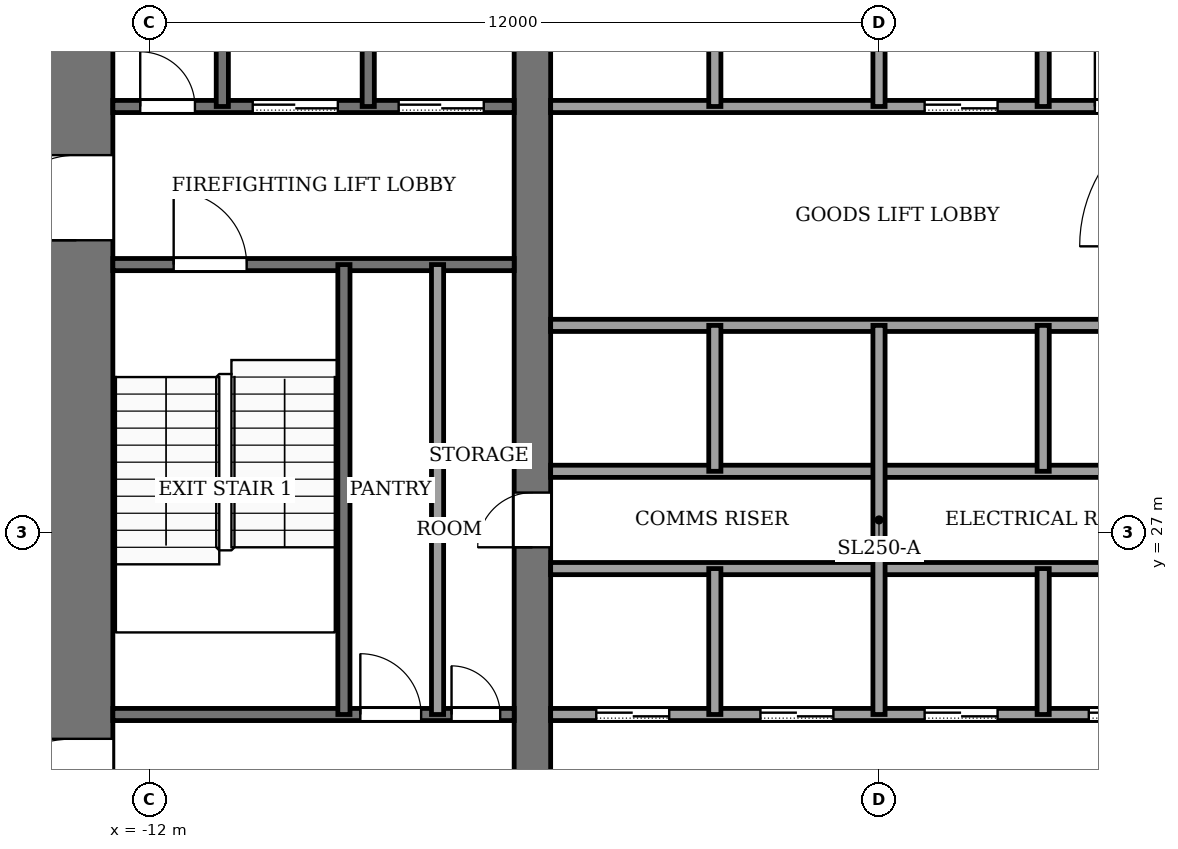
"""IFC4 building model, lengths in metres.
Left out: names, types, materials, properties, quantities, classifications, styles, units other than length and angle.
Written with IfcOpenShell. Run it as: python <this file> out.ifc"""

import sys

from ifc_helpers import new_model, si_unit, direction, frame, frame_2d, origin, place, context, subcontext, project, spatial, rectangle, extrude, element, fill, save


model = new_model("IFC4")
c1 = context("Model", 3, precision=1e-05, world=origin(), true_north=direction((0.0, 1.0)))
c2 = subcontext(c1, "Body", "Model", "MODEL_VIEW")
j1 = project(units=[si_unit("LENGTHUNIT", "METRE"), si_unit("PLANEANGLEUNIT", "RADIAN")], contexts=[c1])
p1 = place(None, origin())
s1 = spatial("IfcSite", under=j1, at=p1, CompositionType="ELEMENT")
p2 = place(p1, origin())
s2 = spatial("IfcBuilding", under=s1, at=p2, CompositionType="ELEMENT")
p3 = place(p2, frame((0.0, 0.0, 106.0)))
s3 = spatial("IfcBuildingStorey", under=s2, at=p3, CompositionType="ELEMENT", Elevation=106.0)
p4 = place(p3, frame((-13.2, 18.4, -0.13), z_axis=(0.0, 0.0, 1.0), x_axis=(0.0, 1.0, 0.0)))
e1 = element("IfcWall", 1, at=p4, inside=s3, PredefinedType="SHEAR", context=c2, shape_type="SweptSolid", body=[
    extrude(rectangle(XDim=19.2, YDim=1.2, at=frame_2d((9.6, 0.0))), origin(), (0.0, 0.0, 1.0), 4.0),
])
p5 = place(p4, frame((2.8, 0.0, 0.13)))
e2 = element("IfcOpeningElement", 2, at=p5, cuts=e1, PredefinedType="OPENING", context=c2, shape_type="SweptSolid", body=[
    extrude(rectangle(XDim=2.4, YDim=2.4, at=frame_2d((1.2, 1.2))), frame((0.0, 0.61, 0.0), z_axis=(0.0, -1.0, 0.0), x_axis=(1.0, 0.0, 0.0)), (0.0, 0.0, 1.0), 1.22),
])
p6 = place(p4, frame((13.4, 0.0, 0.13)))
e3 = element("IfcOpeningElement", 3, at=p6, cuts=e1, PredefinedType="OPENING", context=c2, shape_type="SweptSolid", body=[
    extrude(rectangle(XDim=1.4, YDim=2.2, at=frame_2d((0.7, 1.1))), frame((0.0, 0.61, 0.0), z_axis=(0.0, -1.0, 0.0), x_axis=(1.0, 0.0, 0.0)), (0.0, 0.0, 1.0), 1.22),
])
p7 = place(p3, frame((-5.7, 18.4, -0.13), z_axis=(0.0, 0.0, 1.0), x_axis=(0.0, 1.0, 0.0)))
e4 = element("IfcWall", 4, at=p7, inside=s3, PredefinedType="SHEAR", context=c2, shape_type="SweptSolid", body=[
    extrude(rectangle(XDim=19.2, YDim=0.6, at=frame_2d((9.6, 0.0))), origin(), (0.0, 0.0, 1.0), 4.0),
])
p8 = place(p7, frame((8.35, 0.0, 0.13)))
e5 = element("IfcOpeningElement", 5, at=p8, cuts=e4, PredefinedType="OPENING", context=c2, shape_type="SweptSolid", body=[
    extrude(rectangle(XDim=0.9, YDim=2.1, at=frame_2d((0.45, 1.05))), frame((0.0, 0.31, 0.0), z_axis=(0.0, -1.0, 0.0), x_axis=(1.0, 0.0, 0.0)), (0.0, 0.0, 1.0), 0.62),
])
p9 = place(p3, frame((-12.6, 24.0, 0.0), z_axis=(0.0, 0.0, 1.0), x_axis=(1.0, 0.0, 0.0)))
e6 = element("IfcWall", 6, at=p9, inside=s3, PredefinedType="PARTITIONING", context=c2, shape_type="SweptSolid", body=[
    extrude(rectangle(XDim=6.6, YDim=0.2, at=frame_2d((3.3, 0.0))), origin(), (0.0, 0.0, 1.0), 3.87),
])
p10 = place(p9, frame((4.07, 0.0, 0.0)))
e7 = element("IfcOpeningElement", 7, at=p10, cuts=e6, PredefinedType="OPENING", context=c2, shape_type="SweptSolid", body=[
    extrude(rectangle(XDim=1.0, YDim=2.1, at=frame_2d((0.5, 1.05))), frame((0.0, 0.11, 0.0), z_axis=(0.0, -1.0, 0.0), x_axis=(1.0, 0.0, 0.0)), (0.0, 0.0, 1.0), 0.22),
])
p11 = place(p9, frame((5.57, 0.0, 0.0)))
e8 = element("IfcOpeningElement", 8, at=p11, cuts=e6, PredefinedType="OPENING", context=c2, shape_type="SweptSolid", body=[
    extrude(rectangle(XDim=0.8, YDim=2.1, at=frame_2d((0.4, 1.05))), frame((0.0, 0.11, 0.0), z_axis=(0.0, -1.0, 0.0), x_axis=(1.0, 0.0, 0.0)), (0.0, 0.0, 1.0), 0.22),
])
p12 = place(p3, frame((-5.4, 24.0, 0.0), z_axis=(0.0, 0.0, 1.0), x_axis=(1.0, 0.0, 0.0)))
e9 = element("IfcWall", 9, at=p12, inside=s3, PredefinedType="PARTITIONING", context=c2, shape_type="SweptSolid", body=[
    extrude(rectangle(XDim=10.8, YDim=0.2, at=frame_2d((5.4, 0.0))), origin(), (0.0, 0.0, 1.0), 3.87),
])
p13 = place(p12, frame((0.75, 0.0, 0.0)))
e10 = element("IfcOpeningElement", 10, at=p13, cuts=e9, PredefinedType="OPENING", context=c2, shape_type="SweptSolid", body=[
    extrude(rectangle(XDim=1.2, YDim=2.2, at=frame_2d((0.6, 1.1))), frame((0.0, 0.11, 0.0), z_axis=(0.0, -1.0, 0.0), x_axis=(1.0, 0.0, 0.0)), (0.0, 0.0, 1.0), 0.22),
])
p14 = place(p12, frame((3.45, 0.0, 0.0)))
e11 = element("IfcOpeningElement", 11, at=p14, cuts=e9, PredefinedType="OPENING", context=c2, shape_type="SweptSolid", body=[
    extrude(rectangle(XDim=1.2, YDim=2.2, at=frame_2d((0.6, 1.1))), frame((0.0, 0.11, 0.0), z_axis=(0.0, -1.0, 0.0), x_axis=(1.0, 0.0, 0.0)), (0.0, 0.0, 1.0), 0.22),
])
p15 = place(p12, frame((6.15, 0.0, 0.0)))
e12 = element("IfcOpeningElement", 12, at=p15, cuts=e9, PredefinedType="OPENING", context=c2, shape_type="SweptSolid", body=[
    extrude(rectangle(XDim=1.2, YDim=2.2, at=frame_2d((0.6, 1.1))), frame((0.0, 0.11, 0.0), z_axis=(0.0, -1.0, 0.0), x_axis=(1.0, 0.0, 0.0)), (0.0, 0.0, 1.0), 0.22),
])
p16 = place(p12, frame((8.85, 0.0, 0.0)))
e13 = element("IfcOpeningElement", 13, at=p16, cuts=e9, PredefinedType="OPENING", context=c2, shape_type="SweptSolid", body=[
    extrude(rectangle(XDim=1.2, YDim=2.2, at=frame_2d((0.6, 1.1))), frame((0.0, 0.11, 0.0), z_axis=(0.0, -1.0, 0.0), x_axis=(1.0, 0.0, 0.0)), (0.0, 0.0, 1.0), 0.22),
])
for number, where, z_axis, x_axis in (
    (14, (-5.4, 26.4, 0.0), (0.0, 0.0, 1.0), (1.0, 0.0, 0.0)),
    (15, (-5.4, 28.0, 0.0), (0.0, 0.0, 1.0), (1.0, 0.0, 0.0)),
    (16, (-5.4, 30.4, 0.0), (0.0, 0.0, 1.0), (1.0, 0.0, 0.0)),
):
    element("IfcWall", number, at=place(p3, frame(where, z_axis=z_axis, x_axis=x_axis)), inside=s3, PredefinedType="PARTITIONING", context=c2, shape_type="SweptSolid", body=[
        extrude(rectangle(XDim=10.8, YDim=0.2, at=frame_2d((5.4, 0.0))), origin(), (0.0, 0.0, 1.0), 3.87),
    ])
p17 = place(p3, frame((-12.6, 31.4, 0.0), z_axis=(0.0, 0.0, 1.0), x_axis=(1.0, 0.0, 0.0)))
e17 = element("IfcWall", 17, at=p17, inside=s3, PredefinedType="PARTITIONING", context=c2, shape_type="SweptSolid", body=[
    extrude(rectangle(XDim=6.6, YDim=0.2, at=frame_2d((3.3, 0.0))), origin(), (0.0, 0.0, 1.0), 3.87),
])
p18 = place(p17, frame((1.0, 0.0, 0.0)))
e18 = element("IfcOpeningElement", 18, at=p18, cuts=e17, PredefinedType="OPENING", context=c2, shape_type="SweptSolid", body=[
    extrude(rectangle(XDim=1.2, YDim=2.2, at=frame_2d((0.6, 1.1))), frame((0.0, 0.11, 0.0), z_axis=(0.0, -1.0, 0.0), x_axis=(1.0, 0.0, 0.0)), (0.0, 0.0, 1.0), 0.22),
])
p19 = place(p3, frame((-12.6, 34.0, 0.0), z_axis=(0.0, 0.0, 1.0), x_axis=(1.0, 0.0, 0.0)))
e19 = element("IfcWall", 19, at=p19, inside=s3, PredefinedType="PARTITIONING", context=c2, shape_type="SweptSolid", body=[
    extrude(rectangle(XDim=6.6, YDim=0.2, at=frame_2d((3.3, 0.0))), origin(), (0.0, 0.0, 1.0), 3.87),
])
p20 = place(p19, frame((4.7, 0.0, 0.0)))
e20 = element("IfcOpeningElement", 20, at=p20, cuts=e19, PredefinedType="OPENING", context=c2, shape_type="SweptSolid", body=[
    extrude(rectangle(XDim=1.4, YDim=2.2, at=frame_2d((0.7, 1.1))), frame((0.0, 0.11, 0.0), z_axis=(0.0, -1.0, 0.0), x_axis=(1.0, 0.0, 0.0)), (0.0, 0.0, 1.0), 0.22),
])
p21 = place(p19, frame((2.3, 0.0, 0.0)))
e21 = element("IfcOpeningElement", 21, at=p21, cuts=e19, PredefinedType="OPENING", context=c2, shape_type="SweptSolid", body=[
    extrude(rectangle(XDim=1.4, YDim=2.2, at=frame_2d((0.7, 1.1))), frame((0.0, 0.11, 0.0), z_axis=(0.0, -1.0, 0.0), x_axis=(1.0, 0.0, 0.0)), (0.0, 0.0, 1.0), 0.22),
])
p22 = place(p19, frame((0.45, 0.0, 0.0)))
e22 = element("IfcOpeningElement", 22, at=p22, cuts=e19, PredefinedType="OPENING", context=c2, shape_type="SweptSolid", body=[
    extrude(rectangle(XDim=0.9, YDim=2.1, at=frame_2d((0.45, 1.05))), frame((0.0, 0.11, 0.0), z_axis=(0.0, -1.0, 0.0), x_axis=(1.0, 0.0, 0.0)), (0.0, 0.0, 1.0), 0.22),
])
p23 = place(p3, frame((-5.4, 34.0, 0.0), z_axis=(0.0, 0.0, 1.0), x_axis=(1.0, 0.0, 0.0)))
e23 = element("IfcWall", 23, at=p23, inside=s3, PredefinedType="PARTITIONING", context=c2, shape_type="SweptSolid", body=[
    extrude(rectangle(XDim=10.8, YDim=0.2, at=frame_2d((5.4, 0.0))), origin(), (0.0, 0.0, 1.0), 3.87),
])
p24 = place(p23, frame((6.15, 0.0, 0.0)))
e24 = element("IfcOpeningElement", 24, at=p24, cuts=e23, PredefinedType="OPENING", context=c2, shape_type="SweptSolid", body=[
    extrude(rectangle(XDim=1.2, YDim=2.2, at=frame_2d((0.6, 1.1))), frame((0.0, 0.11, 0.0), z_axis=(0.0, -1.0, 0.0), x_axis=(1.0, 0.0, 0.0)), (0.0, 0.0, 1.0), 0.22),
])
p25 = place(p23, frame((8.95, 0.0, 0.0)))
e25 = element("IfcOpeningElement", 25, at=p25, cuts=e23, PredefinedType="OPENING", context=c2, shape_type="SweptSolid", body=[
    extrude(rectangle(XDim=1.0, YDim=2.1, at=frame_2d((0.5, 1.05))), frame((0.0, 0.11, 0.0), z_axis=(0.0, -1.0, 0.0), x_axis=(1.0, 0.0, 0.0)), (0.0, 0.0, 1.0), 0.22),
])
p26 = place(p3, frame((-10.8, 34.0, 0.0), z_axis=(0.0, 0.0, 1.0), x_axis=(0.0, 1.0, 0.0)))
e26 = element("IfcWall", 26, at=p26, inside=s3, PredefinedType="PARTITIONING", context=c2, shape_type="SweptSolid", body=[
    extrude(rectangle(XDim=3.6, YDim=0.2, at=frame_2d((1.8, 0.0))), origin(), (0.0, 0.0, 1.0), 3.87),
])
p27 = place(p3, frame((-8.8, 24.0, 0.0), z_axis=(0.0, 0.0, 1.0), x_axis=(0.0, 1.0, 0.0)))
e27 = element("IfcWall", 27, at=p27, inside=s3, PredefinedType="PARTITIONING", context=c2, shape_type="SweptSolid", body=[
    extrude(rectangle(XDim=7.4, YDim=0.2, at=frame_2d((3.7, 0.0))), origin(), (0.0, 0.0, 1.0), 3.87),
])
p28 = place(p3, frame((-8.4, 34.0, 0.0), z_axis=(0.0, 0.0, 1.0), x_axis=(0.0, 1.0, 0.0)))
e28 = element("IfcWall", 28, at=p28, inside=s3, PredefinedType="PARTITIONING", context=c2, shape_type="SweptSolid", body=[
    extrude(rectangle(XDim=3.6, YDim=0.2, at=frame_2d((1.8, 0.0))), origin(), (0.0, 0.0, 1.0), 3.87),
])
p29 = place(p3, frame((-7.26, 24.0, 0.0), z_axis=(0.0, 0.0, 1.0), x_axis=(0.0, 1.0, 0.0)))
e29 = element("IfcWall", 29, at=p29, inside=s3, PredefinedType="PARTITIONING", context=c2, shape_type="SweptSolid", body=[
    extrude(rectangle(XDim=7.4, YDim=0.2, at=frame_2d((3.7, 0.0))), origin(), (0.0, 0.0, 1.0), 3.87),
])
for number, where, z_axis, x_axis in (
    (30, (-2.7, 24.0, 0.0), (0.0, 0.0, 1.0), (0.0, 1.0, 0.0)),
    (31, (-2.7, 28.0, 0.0), (0.0, 0.0, 1.0), (0.0, 1.0, 0.0)),
):
    element("IfcWall", number, at=place(p3, frame(where, z_axis=z_axis, x_axis=x_axis)), inside=s3, PredefinedType="PARTITIONING", context=c2, shape_type="SweptSolid", body=[
        extrude(rectangle(XDim=2.4, YDim=0.2, at=frame_2d((1.2, 0.0))), origin(), (0.0, 0.0, 1.0), 3.87),
    ])
p30 = place(p3, frame((-2.7, 34.0, 0.0), z_axis=(0.0, 0.0, 1.0), x_axis=(0.0, 1.0, 0.0)))
e32 = element("IfcWall", 32, at=p30, inside=s3, PredefinedType="PARTITIONING", context=c2, shape_type="SweptSolid", body=[
    extrude(rectangle(XDim=3.6, YDim=0.2, at=frame_2d((1.8, 0.0))), origin(), (0.0, 0.0, 1.0), 3.87),
])
p31 = place(p3, frame((0.0, 24.0, 0.0), z_axis=(0.0, 0.0, 1.0), x_axis=(0.0, 1.0, 0.0)))
e33 = element("IfcWall", 33, at=p31, inside=s3, PredefinedType="PARTITIONING", context=c2, shape_type="SweptSolid", body=[
    extrude(rectangle(XDim=6.4, YDim=0.2, at=frame_2d((3.2, 0.0))), origin(), (0.0, 0.0, 1.0), 3.87),
])
p32 = place(p3, frame((0.0, 34.0, 0.0), z_axis=(0.0, 0.0, 1.0), x_axis=(0.0, 1.0, 0.0)))
e34 = element("IfcWall", 34, at=p32, inside=s3, PredefinedType="PARTITIONING", context=c2, shape_type="SweptSolid", body=[
    extrude(rectangle(XDim=3.6, YDim=0.2, at=frame_2d((1.8, 0.0))), origin(), (0.0, 0.0, 1.0), 3.87),
])
for number, where, z_axis, x_axis in (
    (35, (2.7, 24.0, 0.0), (0.0, 0.0, 1.0), (0.0, 1.0, 0.0)),
    (36, (2.7, 28.0, 0.0), (0.0, 0.0, 1.0), (0.0, 1.0, 0.0)),
):
    element("IfcWall", number, at=place(p3, frame(where, z_axis=z_axis, x_axis=x_axis)), inside=s3, PredefinedType="PARTITIONING", context=c2, shape_type="SweptSolid", body=[
        extrude(rectangle(XDim=2.4, YDim=0.2, at=frame_2d((1.2, 0.0))), origin(), (0.0, 0.0, 1.0), 3.87),
    ])
p33 = place(p3, frame((2.7, 34.0, 0.0), z_axis=(0.0, 0.0, 1.0), x_axis=(0.0, 1.0, 0.0)))
e37 = element("IfcWall", 37, at=p33, inside=s3, PredefinedType="PARTITIONING", context=c2, shape_type="SweptSolid", body=[
    extrude(rectangle(XDim=3.6, YDim=0.2, at=frame_2d((1.8, 0.0))), origin(), (0.0, 0.0, 1.0), 3.87),
])
p34 = place(p13, origin())
e38 = element("IfcDoor", 38, at=p34, inside=s3, OperationType="SLIDING_TO_LEFT", PredefinedType="DOOR", context=c2, shape_type="SweptSolid", body=[
    extrude(rectangle(XDim=1.2, YDim=2.2, at=frame_2d((0.6, 1.1))), frame((0.0, 0.025, 0.0), z_axis=(0.0, -1.0, 0.0), x_axis=(1.0, 0.0, 0.0)), (0.0, 0.0, 1.0), 0.05),
])
fill(e10, e38)
p35 = place(p14, origin())
e39 = element("IfcDoor", 39, at=p35, inside=s3, OperationType="SLIDING_TO_LEFT", PredefinedType="DOOR", context=c2, shape_type="SweptSolid", body=[
    extrude(rectangle(XDim=1.2, YDim=2.2, at=frame_2d((0.6, 1.1))), frame((0.0, 0.025, 0.0), z_axis=(0.0, -1.0, 0.0), x_axis=(1.0, 0.0, 0.0)), (0.0, 0.0, 1.0), 0.05),
])
fill(e11, e39)
p36 = place(p15, origin())
e40 = element("IfcDoor", 40, at=p36, inside=s3, OperationType="SLIDING_TO_LEFT", PredefinedType="DOOR", context=c2, shape_type="SweptSolid", body=[
    extrude(rectangle(XDim=1.2, YDim=2.2, at=frame_2d((0.6, 1.1))), frame((0.0, 0.025, 0.0), z_axis=(0.0, -1.0, 0.0), x_axis=(1.0, 0.0, 0.0)), (0.0, 0.0, 1.0), 0.05),
])
fill(e12, e40)
p37 = place(p16, origin())
e41 = element("IfcDoor", 41, at=p37, inside=s3, OperationType="SLIDING_TO_LEFT", PredefinedType="DOOR", context=c2, shape_type="SweptSolid", body=[
    extrude(rectangle(XDim=1.2, YDim=2.2, at=frame_2d((0.6, 1.1))), frame((0.0, 0.025, 0.0), z_axis=(0.0, -1.0, 0.0), x_axis=(1.0, 0.0, 0.0)), (0.0, 0.0, 1.0), 0.05),
])
fill(e13, e41)
p38 = place(p24, origin())
e42 = element("IfcDoor", 42, at=p38, inside=s3, OperationType="SLIDING_TO_LEFT", PredefinedType="DOOR", context=c2, shape_type="SweptSolid", body=[
    extrude(rectangle(XDim=1.2, YDim=2.2, at=frame_2d((0.6, 1.1))), frame((0.0, 0.025, 0.0), z_axis=(0.0, -1.0, 0.0), x_axis=(1.0, 0.0, 0.0)), (0.0, 0.0, 1.0), 0.05),
])
fill(e24, e42)
p39 = place(p20, origin())
e43 = element("IfcDoor", 43, at=p39, inside=s3, OperationType="SLIDING_TO_LEFT", PredefinedType="DOOR", context=c2, shape_type="SweptSolid", body=[
    extrude(rectangle(XDim=1.4, YDim=2.2, at=frame_2d((0.7, 1.1))), frame((0.0, 0.025, 0.0), z_axis=(0.0, -1.0, 0.0), x_axis=(1.0, 0.0, 0.0)), (0.0, 0.0, 1.0), 0.05),
])
fill(e20, e43)
p40 = place(p21, origin())
e44 = element("IfcDoor", 44, at=p40, inside=s3, OperationType="SLIDING_TO_LEFT", PredefinedType="DOOR", context=c2, shape_type="SweptSolid", body=[
    extrude(rectangle(XDim=1.4, YDim=2.2, at=frame_2d((0.7, 1.1))), frame((0.0, 0.025, 0.0), z_axis=(0.0, -1.0, 0.0), x_axis=(1.0, 0.0, 0.0)), (0.0, 0.0, 1.0), 0.05),
])
fill(e21, e44)
p41 = place(p22, origin())
e45 = element("IfcDoor", 45, at=p41, inside=s3, OperationType="SINGLE_SWING_RIGHT", PredefinedType="DOOR", context=c2, shape_type="SweptSolid", body=[
    extrude(rectangle(XDim=0.9, YDim=2.1, at=frame_2d((0.45, 1.05))), frame((0.0, 0.025, 0.0), z_axis=(0.0, -1.0, 0.0), x_axis=(1.0, 0.0, 0.0)), (0.0, 0.0, 1.0), 0.05),
])
fill(e22, e45)
p42 = place(p10, origin())
e46 = element("IfcDoor", 46, at=p42, inside=s3, OperationType="SINGLE_SWING_RIGHT", PredefinedType="DOOR", context=c2, shape_type="SweptSolid", body=[
    extrude(rectangle(XDim=1.0, YDim=2.1, at=frame_2d((0.5, 1.05))), frame((0.0, 0.025, 0.0), z_axis=(0.0, -1.0, 0.0), x_axis=(1.0, 0.0, 0.0)), (0.0, 0.0, 1.0), 0.05),
])
fill(e7, e46)
p43 = place(p11, origin())
e47 = element("IfcDoor", 47, at=p43, inside=s3, OperationType="SINGLE_SWING_LEFT", PredefinedType="DOOR", context=c2, shape_type="SweptSolid", body=[
    extrude(rectangle(XDim=0.8, YDim=2.1, at=frame_2d((0.4, 1.05))), frame((0.0, 0.025, 0.0), z_axis=(0.0, -1.0, 0.0), x_axis=(1.0, 0.0, 0.0)), (0.0, 0.0, 1.0), 0.05),
])
fill(e8, e47)
p44 = place(p25, origin())
e48 = element("IfcDoor", 48, at=p44, inside=s3, OperationType="SINGLE_SWING_LEFT", PredefinedType="DOOR", context=c2, shape_type="SweptSolid", body=[
    extrude(rectangle(XDim=1.0, YDim=2.1, at=frame_2d((0.5, 1.05))), frame((0.0, 0.025, 0.0), z_axis=(0.0, -1.0, 0.0), x_axis=(1.0, 0.0, 0.0)), (0.0, 0.0, 1.0), 0.05),
])
fill(e25, e48)
p45 = place(p8, origin())
e49 = element("IfcDoor", 49, at=p45, inside=s3, OperationType="SINGLE_SWING_LEFT", PredefinedType="DOOR", context=c2, shape_type="SweptSolid", body=[
    extrude(rectangle(XDim=0.9, YDim=2.1, at=frame_2d((0.45, 1.05))), frame((0.0, 0.025, 0.0), z_axis=(0.0, -1.0, 0.0), x_axis=(1.0, 0.0, 0.0)), (0.0, 0.0, 1.0), 0.05),
])
fill(e5, e49)
p46 = place(p18, origin())
e50 = element("IfcDoor", 50, at=p46, inside=s3, OperationType="SINGLE_SWING_RIGHT", PredefinedType="DOOR", context=c2, shape_type="SweptSolid", body=[
    extrude(rectangle(XDim=1.2, YDim=2.2, at=frame_2d((0.6, 1.1))), frame((0.0, 0.025, 0.0), z_axis=(0.0, -1.0, 0.0), x_axis=(1.0, 0.0, 0.0)), (0.0, 0.0, 1.0), 0.05),
])
fill(e18, e50)
p47 = place(p5, origin())
e51 = element("IfcDoor", 51, at=p47, inside=s3, OperationType="DOUBLE_DOOR_SINGLE_SWING", PredefinedType="DOOR", context=c2, shape_type="SweptSolid", body=[
    extrude(rectangle(XDim=2.4, YDim=2.4, at=frame_2d((1.2, 1.2))), frame((0.0, 0.025, 0.0), z_axis=(0.0, -1.0, 0.0), x_axis=(1.0, 0.0, 0.0)), (0.0, 0.0, 1.0), 0.05),
])
fill(e2, e51)
p48 = place(p6, origin())
e52 = element("IfcDoor", 52, at=p48, inside=s3, OperationType="SINGLE_SWING_RIGHT", PredefinedType="DOOR", context=c2, shape_type="SweptSolid", body=[
    extrude(rectangle(XDim=1.4, YDim=2.2, at=frame_2d((0.7, 1.1))), frame((0.0, 0.025, 0.0), z_axis=(0.0, -1.0, 0.0), x_axis=(1.0, 0.0, 0.0)), (0.0, 0.0, 1.0), 0.05),
])
fill(e3, e52)
save(model, sys.argv[1])
